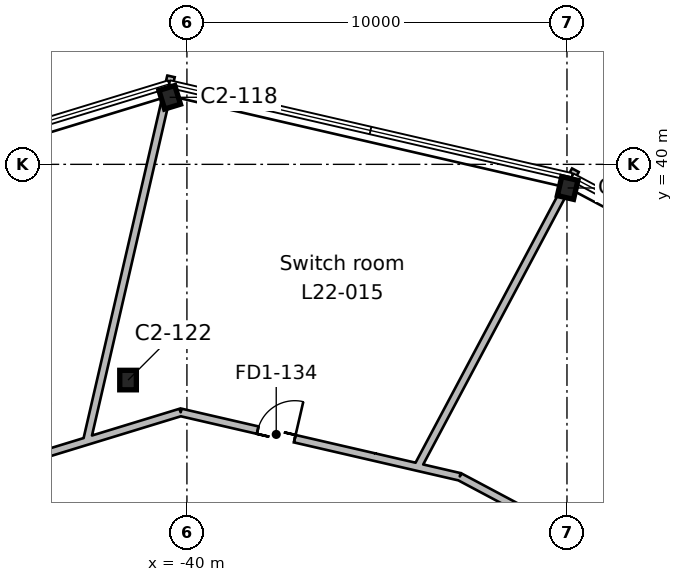
"""IFC4 building model, lengths in metres.
Left out: names, types, materials, properties, quantities, classifications, styles, units other than length and angle.
Written with IfcOpenShell. Run it as: python <this file> out.ifc"""

import sys

from ifc_helpers import new_model, si_unit, direction, frame, frame_2d, origin, origin_2d, place, context, subcontext, project, spatial, rectangle, i_section, extrude, element, fill, save


model = new_model("IFC4")
c1 = context("Model", 3, precision=1e-05, world=origin(), true_north=direction((0.0, 1.0)))
c2 = subcontext(c1, "Body", "Model", "MODEL_VIEW")
j1 = project(units=[si_unit("LENGTHUNIT", "METRE"), si_unit("PLANEANGLEUNIT", "RADIAN")], contexts=[c1])
p1 = place(None, origin())
s1 = spatial("IfcSite", under=j1, at=p1, CompositionType="ELEMENT")
p2 = place(p1, origin())
s2 = spatial("IfcBuilding", under=s1, at=p2, CompositionType="ELEMENT")
p3 = place(p2, frame((0.0, 0.0, 112.2)))
s3 = spatial("IfcBuildingStorey", under=s2, at=p3, CompositionType="ELEMENT", Elevation=112.2)
for number, where, z_axis, x_axis in (
    (1, (-41.549, 34.324, 0.0), (0.0, 0.0, 1.0), (1.0, 0.0, 0.0)),
    (2, (-29.982, 39.378, 0.0), (0.0, 0.0, 1.0), (-0.974, 0.225, 0.0)),
    (3, (-40.453, 41.764, 0.0), (0.0, 0.0, 1.0), (-0.956, -0.292, 0.0)),
):
    element("IfcColumn", number, at=place(p3, frame(where, z_axis=z_axis, x_axis=x_axis)), inside=s3, PredefinedType="COLUMN", context=c2, shape_type="SweptSolid", body=[
        extrude(i_section(OverallWidth=0.437, OverallDepth=0.513, WebThickness=0.061, FlangeThickness=0.097, FilletRadius=0.015, at=origin_2d()), origin(), (0.0, 0.0, 1.0), 6.0),
    ])
p4 = place(p3, frame((-42.602, 32.729, 0.0), z_axis=(0.0, 0.0, 1.0), x_axis=(-0.956266283447, -0.292497513052, 0.0)))
e4 = element("IfcWall", 4, at=p4, inside=s3, PredefinedType="PARTITIONING", context=c2, shape_type="SweptSolid", body=[
    extrude(rectangle(XDim=3.846, YDim=0.2, at=frame_2d((1.923, 0.0))), origin(), (0.0, 0.0, 1.0), 5.55),
])
p5 = place(p4, frame((1.567, 0.0, 0.0)))
e5 = element("IfcOpeningElement", 5, at=p5, cuts=e4, PredefinedType="OPENING", context=c2, shape_type="SweptSolid", body=[
    extrude(rectangle(XDim=1.0, YDim=2.1, at=frame_2d((0.5, 1.05))), frame((0.0, 0.11, 0.0), z_axis=(0.0, -1.0, 0.0), x_axis=(1.0, 0.0, 0.0)), (0.0, 0.0, 1.0), 0.22),
])
p6 = place(p3, frame((-40.419, 42.315, 0.0), z_axis=(0.0, 0.0, 1.0), x_axis=(-0.224921063823, -0.974376988157, 0.0)))
e6 = element("IfcWall", 6, at=p6, inside=s3, PredefinedType="PARTITIONING", context=c2, shape_type="SweptSolid", body=[
    extrude(rectangle(XDim=9.848, YDim=0.2, at=frame_2d((4.924, 0.0))), origin(), (0.0, 0.0, 1.0), 5.55),
])
p7 = place(p3, frame((-35.068, 32.298, 0.0), z_axis=(0.0, 0.0, 1.0), x_axis=(-0.974389622126, 0.224866325386, 0.0)))
e7 = element("IfcWall", 7, at=p7, inside=s3, PredefinedType="PARTITIONING", context=c2, shape_type="SweptSolid", body=[
    extrude(rectangle(XDim=5.23, YDim=0.2, at=frame_2d((2.615, 0.0))), origin(), (0.0, 0.0, 1.0), 5.55),
])
p8 = place(p7, frame((2.15, 0.0, 0.0)))
e8 = element("IfcOpeningElement", 8, at=p8, cuts=e7, PredefinedType="OPENING", context=c2, shape_type="SweptSolid", body=[
    extrude(rectangle(XDim=1.0, YDim=2.1, at=frame_2d((0.5, 1.05))), frame((0.0, 0.11, 0.0), z_axis=(0.0, -1.0, 0.0), x_axis=(1.0, 0.0, 0.0)), (0.0, 0.0, 1.0), 0.22),
])
p9 = place(p3, frame((-40.164, 33.474, 0.0), z_axis=(0.0, 0.0, 1.0), x_axis=(-0.95633223978, -0.292281794092, 0.0)))
e9 = element("IfcWall", 9, at=p9, inside=s3, PredefinedType="PARTITIONING", context=c2, shape_type="SweptSolid", body=[
    extrude(rectangle(XDim=2.549, YDim=0.2, at=frame_2d((1.275, 0.0))), origin(), (0.0, 0.0, 1.0), 5.55),
])
p10 = place(p3, frame((-35.068, 32.298, 0.0), z_axis=(0.0, 0.0, 1.0), x_axis=(0.974257527465, -0.225437951946, 0.0)))
e10 = element("IfcWall", 10, at=p10, inside=s3, PredefinedType="PARTITIONING", context=c2, shape_type="SweptSolid", body=[
    extrude(rectangle(XDim=1.202, YDim=0.2, at=frame_2d((0.601, 0.0))), origin(), (0.0, 0.0, 1.0), 5.55),
])
p11 = place(p3, frame((-29.779, 39.846, 0.0), z_axis=(0.0, 0.0, 1.0), x_axis=(-0.469439041073, -0.882964884192, 0.0)))
e11 = element("IfcWall", 11, at=p11, inside=s3, PredefinedType="PARTITIONING", context=c2, shape_type="SweptSolid", body=[
    extrude(rectangle(XDim=8.846, YDim=0.2, at=frame_2d((4.423, 0.0))), origin(), (0.0, 0.0, 1.0), 5.55),
])
p12 = place(p3, frame((-32.823, 31.779, 0.0), z_axis=(0.0, 0.0, 1.0), x_axis=(-0.974350116036, 0.225037444395, 0.0)))
e12 = element("IfcWall", 12, at=p12, inside=s3, PredefinedType="PARTITIONING", context=c2, shape_type="SweptSolid", body=[
    extrude(rectangle(XDim=1.102, YDim=0.2, at=frame_2d((0.551, 0.0))), origin(), (0.0, 0.0, 1.0), 5.55),
])
p13 = place(p3, frame((-32.823, 31.779, 0.0), z_axis=(0.0, 0.0, 1.0), x_axis=(0.88294925653, -0.469468433863, 0.0)))
e13 = element("IfcWall", 13, at=p13, inside=s3, PredefinedType="PARTITIONING", context=c2, shape_type="SweptSolid", body=[
    extrude(rectangle(XDim=37.174, YDim=0.2, at=frame_2d((18.587, 0.0))), origin(), (0.0, 0.0, 1.0), 5.55),
])
p14 = place(p13, frame((18.05, 0.0, 0.0)))
e14 = element("IfcOpeningElement", 14, at=p14, cuts=e13, PredefinedType="OPENING", context=c2, shape_type="SweptSolid", body=[
    extrude(rectangle(XDim=1.0, YDim=2.1, at=frame_2d((0.5, 1.05))), frame((0.0, 0.11, 0.0), z_axis=(0.0, -1.0, 0.0), x_axis=(1.0, 0.0, 0.0)), (0.0, 0.0, 1.0), 0.22),
])
p15 = place(p13, frame((9.05, 0.0, 0.0)))
e15 = element("IfcOpeningElement", 15, at=p15, cuts=e13, PredefinedType="OPENING", context=c2, shape_type="SweptSolid", body=[
    extrude(rectangle(XDim=1.0, YDim=2.1, at=frame_2d((0.5, 1.05))), frame((0.0, 0.11, 0.0), z_axis=(0.0, -1.0, 0.0), x_axis=(1.0, 0.0, 0.0)), (0.0, 0.0, 1.0), 0.22),
])
p16 = place(p8, frame((1.0, 0.0, 0.0), z_axis=(0.0, 0.0, 1.0), x_axis=(-1.0, 0.0, 0.0)))
e16 = element("IfcDoor", 16, at=p16, inside=s3, OperationType="SINGLE_SWING_RIGHT", PredefinedType="DOOR", context=c2, shape_type="SweptSolid", body=[
    extrude(rectangle(XDim=1.0, YDim=2.1, at=frame_2d((0.5, 1.05))), frame((0.0, 0.025, 0.0), z_axis=(0.0, -1.0, 0.0), x_axis=(1.0, 0.0, 0.0)), (0.0, 0.0, 1.0), 0.05),
])
fill(e8, e16)
save(model, sys.argv[1])
